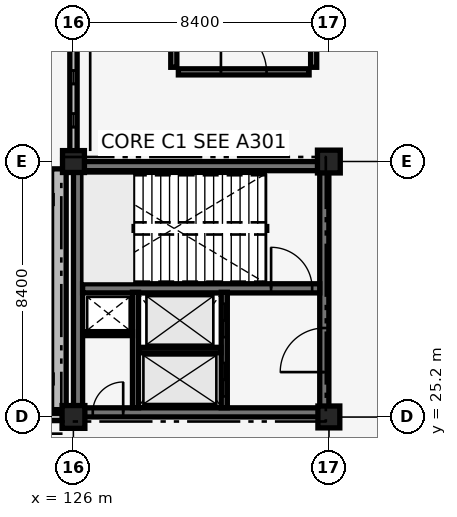
"""IFC4 building model, lengths in metres.
Left out: names, types, materials, properties, quantities, classifications, styles, units other than length and angle.
Written with IfcOpenShell. Run it as: python <this file> out.ifc"""

import sys

from ifc_helpers import new_model, si_unit, direction, frame, frame_2d, origin, origin_2d, place, context, subcontext, project, spatial, rectangle, extrude, element, fill, save


model = new_model("IFC4")
c1 = context("Model", 3, precision=1e-05, world=origin(), true_north=direction((0.0, 1.0)))
c2 = subcontext(c1, "Body", "Model", "MODEL_VIEW")
j1 = project(units=[si_unit("LENGTHUNIT", "METRE"), si_unit("PLANEANGLEUNIT", "RADIAN")], contexts=[c1])
p1 = place(None, origin())
s1 = spatial("IfcSite", under=j1, at=p1, CompositionType="ELEMENT")
p2 = place(p1, origin())
s2 = spatial("IfcBuilding", under=s1, at=p2, CompositionType="ELEMENT")
p3 = place(p2, origin())
s3 = spatial("IfcBuildingStorey", under=s2, at=p3, CompositionType="ELEMENT", Elevation=0.0)
p4 = place(p3, frame((126.15, 25.35, 0.0), z_axis=(0.0, 0.0, 1.0), x_axis=(1.0, 0.0, 0.0)))
e1 = element("IfcWall", 1, at=p4, inside=s3, PredefinedType="SHEAR", context=c2, shape_type="SweptSolid", body=[
    extrude(rectangle(XDim=8.1, YDim=0.3, at=frame_2d((4.05, 0.0))), origin(), (0.0, 0.0, 1.0), 5.14),
])
p5 = place(p4, frame((0.485, 0.0, 0.0)))
e2 = element("IfcOpeningElement", 2, at=p5, cuts=e1, PredefinedType="OPENING", context=c2, shape_type="SweptSolid", body=[
    extrude(rectangle(XDim=1.0, YDim=2.15, at=frame_2d((0.5, 1.075))), frame((0.0, 0.16, 0.0), z_axis=(0.0, -1.0, 0.0), x_axis=(1.0, 0.0, 0.0)), (0.0, 0.0, 1.0), 0.32),
])
p6 = place(p3, frame((126.15, 33.45, 0.0), z_axis=(0.0, 0.0, 1.0), x_axis=(1.0, 0.0, 0.0)))
e3 = element("IfcWall", 3, at=p6, inside=s3, PredefinedType="SHEAR", context=c2, shape_type="SweptSolid", body=[
    extrude(rectangle(XDim=8.1, YDim=0.3, at=frame_2d((4.05, 0.0))), origin(), (0.0, 0.0, 1.0), 5.14),
])
p7 = place(p3, frame((126.15, 25.35, 0.0), z_axis=(0.0, 0.0, 1.0), x_axis=(0.0, 1.0, 0.0)))
e4 = element("IfcWall", 4, at=p7, inside=s3, PredefinedType="SHEAR", context=c2, shape_type="SweptSolid", body=[
    extrude(rectangle(XDim=8.1, YDim=0.3, at=frame_2d((4.05, 0.0))), origin(), (0.0, 0.0, 1.0), 5.14),
])
p8 = place(p3, frame((134.25, 25.35, 0.0), z_axis=(0.0, 0.0, 1.0), x_axis=(0.0, 1.0, 0.0)))
e5 = element("IfcWall", 5, at=p8, inside=s3, PredefinedType="SHEAR", context=c2, shape_type="SweptSolid", body=[
    extrude(rectangle(XDim=8.1, YDim=0.3, at=frame_2d((4.05, 0.0))), origin(), (0.0, 0.0, 1.0), 5.14),
])
p9 = place(p8, frame((1.325, 0.0, 0.0)))
e6 = element("IfcOpeningElement", 6, at=p9, cuts=e5, PredefinedType="OPENING", context=c2, shape_type="SweptSolid", body=[
    extrude(rectangle(XDim=1.45, YDim=2.15, at=frame_2d((0.725, 1.075))), frame((0.0, 0.16, 0.0), z_axis=(0.0, -1.0, 0.0), x_axis=(1.0, 0.0, 0.0)), (0.0, 0.0, 1.0), 0.32),
])
p10 = place(p3, frame((126.3, 29.43, 0.0), z_axis=(0.0, 0.0, 1.0), x_axis=(1.0, 0.0, 0.0)))
e7 = element("IfcWall", 7, at=p10, inside=s3, PredefinedType="SHEAR", context=c2, shape_type="SweptSolid", body=[
    extrude(rectangle(XDim=7.8, YDim=0.3, at=frame_2d((3.9, 0.0))), origin(), (0.0, 0.0, 1.0), 5.14),
])
p11 = place(p10, frame((6.2, 0.0, 0.0)))
e8 = element("IfcOpeningElement", 8, at=p11, cuts=e7, PredefinedType="OPENING", context=c2, shape_type="SweptSolid", body=[
    extrude(rectangle(XDim=1.35, YDim=2.15, at=frame_2d((0.675, 1.075))), frame((0.0, 0.16, 0.0), z_axis=(0.0, -1.0, 0.0), x_axis=(1.0, 0.0, 0.0)), (0.0, 0.0, 1.0), 0.32),
])
p12 = place(p3, frame((126.0, 25.2, 0.0), z_axis=(0.0, 0.0, 1.0), x_axis=(1.0, 0.0, 0.0)))
e9 = element("IfcColumn", 9, at=p12, inside=s3, PredefinedType="COLUMN", context=c2, shape_type="SweptSolid", body=[
    extrude(rectangle(XDim=0.75, YDim=0.75, at=origin_2d()), origin(), (0.0, 0.0, 1.0), 5.14),
])
for number, where, z_axis, x_axis in (
    (10, (126.0, 33.6, 0.0), (0.0, 0.0, 1.0), (1.0, 0.0, 0.0)),
    (11, (134.4, 25.2, 0.0), (0.0, 0.0, 1.0), (1.0, 0.0, 0.0)),
):
    element("IfcColumn", number, at=place(p3, frame(where, z_axis=z_axis, x_axis=x_axis)), inside=s3, PredefinedType="COLUMN", context=c2, shape_type="SweptSolid", body=[
        extrude(rectangle(XDim=0.72, YDim=0.72, at=origin_2d()), origin(), (0.0, 0.0, 1.0), 5.14),
    ])
p13 = place(p3, frame((134.4, 33.6, 0.0), z_axis=(0.0, 0.0, 1.0), x_axis=(1.0, 0.0, 0.0)))
e12 = element("IfcColumn", 12, at=p13, inside=s3, PredefinedType="COLUMN", context=c2, shape_type="SweptSolid", body=[
    extrude(rectangle(XDim=0.75, YDim=0.75, at=origin_2d()), origin(), (0.0, 0.0, 1.0), 5.14),
])
p14 = place(p3, frame((117.875, 25.2, 0.0), z_axis=(0.0, 0.0, 1.0), x_axis=(1.0, 0.0, 0.0)))
e13 = element("IfcWall", 13, at=p14, inside=s3, PredefinedType="SOLIDWALL", context=c2, shape_type="SweptSolid", body=[
    extrude(rectangle(XDim=7.765, YDim=0.24, at=frame_2d((3.882, 0.0))), origin(), (0.0, 0.0, 1.0), 4.39),
])
p15 = place(p14, frame((0.796, 0.0, 0.35)))
e14 = element("IfcOpeningElement", 14, at=p15, cuts=e13, PredefinedType="OPENING", context=c2, shape_type="SweptSolid", body=[
    extrude(rectangle(XDim=0.44, YDim=1.25, at=frame_2d((0.22, 0.625))), frame((0.0, 0.13, 0.0), z_axis=(0.0, -1.0, 0.0), x_axis=(1.0, 0.0, 0.0)), (0.0, 0.0, 1.0), 0.26),
])
p16 = place(p14, frame((2.229, 0.0, 0.35)))
e15 = element("IfcOpeningElement", 15, at=p16, cuts=e13, PredefinedType="OPENING", context=c2, shape_type="SweptSolid", body=[
    extrude(rectangle(XDim=0.44, YDim=1.25, at=frame_2d((0.22, 0.625))), frame((0.0, 0.13, 0.0), z_axis=(0.0, -1.0, 0.0), x_axis=(1.0, 0.0, 0.0)), (0.0, 0.0, 1.0), 0.26),
])
p17 = place(p14, frame((3.663, 0.0, 0.35)))
e16 = element("IfcOpeningElement", 16, at=p17, cuts=e13, PredefinedType="OPENING", context=c2, shape_type="SweptSolid", body=[
    extrude(rectangle(XDim=0.44, YDim=1.25, at=frame_2d((0.22, 0.625))), frame((0.0, 0.13, 0.0), z_axis=(0.0, -1.0, 0.0), x_axis=(1.0, 0.0, 0.0)), (0.0, 0.0, 1.0), 0.26),
])
p18 = place(p14, frame((5.095, 0.0, 0.35)))
e17 = element("IfcOpeningElement", 17, at=p18, cuts=e13, PredefinedType="OPENING", context=c2, shape_type="SweptSolid", body=[
    extrude(rectangle(XDim=0.44, YDim=1.25, at=frame_2d((0.22, 0.625))), frame((0.0, 0.13, 0.0), z_axis=(0.0, -1.0, 0.0), x_axis=(1.0, 0.0, 0.0)), (0.0, 0.0, 1.0), 0.26),
])
p19 = place(p14, frame((6.529, 0.0, 0.35)))
e18 = element("IfcOpeningElement", 18, at=p19, cuts=e13, PredefinedType="OPENING", context=c2, shape_type="SweptSolid", body=[
    extrude(rectangle(XDim=0.44, YDim=1.25, at=frame_2d((0.22, 0.625))), frame((0.0, 0.13, 0.0), z_axis=(0.0, -1.0, 0.0), x_axis=(1.0, 0.0, 0.0)), (0.0, 0.0, 1.0), 0.26),
])
p20 = place(p14, frame((0.796, 0.0, 1.8)))
e19 = element("IfcOpeningElement", 19, at=p20, cuts=e13, PredefinedType="OPENING", context=c2, shape_type="SweptSolid", body=[
    extrude(rectangle(XDim=0.44, YDim=1.25, at=frame_2d((0.22, 0.625))), frame((0.0, 0.13, 0.0), z_axis=(0.0, -1.0, 0.0), x_axis=(1.0, 0.0, 0.0)), (0.0, 0.0, 1.0), 0.26),
])
p21 = place(p14, frame((2.229, 0.0, 1.8)))
e20 = element("IfcOpeningElement", 20, at=p21, cuts=e13, PredefinedType="OPENING", context=c2, shape_type="SweptSolid", body=[
    extrude(rectangle(XDim=0.44, YDim=1.25, at=frame_2d((0.22, 0.625))), frame((0.0, 0.13, 0.0), z_axis=(0.0, -1.0, 0.0), x_axis=(1.0, 0.0, 0.0)), (0.0, 0.0, 1.0), 0.26),
])
p22 = place(p14, frame((3.663, 0.0, 1.8)))
e21 = element("IfcOpeningElement", 21, at=p22, cuts=e13, PredefinedType="OPENING", context=c2, shape_type="SweptSolid", body=[
    extrude(rectangle(XDim=0.44, YDim=1.25, at=frame_2d((0.22, 0.625))), frame((0.0, 0.13, 0.0), z_axis=(0.0, -1.0, 0.0), x_axis=(1.0, 0.0, 0.0)), (0.0, 0.0, 1.0), 0.26),
])
p23 = place(p14, frame((5.095, 0.0, 1.8)))
e22 = element("IfcOpeningElement", 22, at=p23, cuts=e13, PredefinedType="OPENING", context=c2, shape_type="SweptSolid", body=[
    extrude(rectangle(XDim=0.44, YDim=1.25, at=frame_2d((0.22, 0.625))), frame((0.0, 0.13, 0.0), z_axis=(0.0, -1.0, 0.0), x_axis=(1.0, 0.0, 0.0)), (0.0, 0.0, 1.0), 0.26),
])
p24 = place(p14, frame((6.529, 0.0, 1.8)))
e23 = element("IfcOpeningElement", 23, at=p24, cuts=e13, PredefinedType="OPENING", context=c2, shape_type="SweptSolid", body=[
    extrude(rectangle(XDim=0.44, YDim=1.25, at=frame_2d((0.22, 0.625))), frame((0.0, 0.13, 0.0), z_axis=(0.0, -1.0, 0.0), x_axis=(1.0, 0.0, 0.0)), (0.0, 0.0, 1.0), 0.26),
])
p25 = place(p3, frame((125.52, 25.44, -0.25), z_axis=(0.0, 0.0, 1.0), x_axis=(0.0, 1.0, 0.0)))
e24 = element("IfcWall", 24, at=p25, inside=s3, PredefinedType="SOLIDWALL", context=c2, shape_type="SweptSolid", body=[
    extrude(rectangle(XDim=7.92, YDim=0.48, at=frame_2d((3.96, 0.0))), origin(), (0.0, 0.0, 1.0), 5.69),
])
p26 = place(p3, frame((126.0, 33.945, 0.0), z_axis=(0.0, 0.0, 1.0), x_axis=(0.0, 1.0, 0.0)))
e25 = element("IfcWall", 25, at=p26, inside=s3, PredefinedType="SOLIDWALL", context=c2, shape_type="SweptSolid", body=[
    extrude(rectangle(XDim=7.695, YDim=0.24, at=frame_2d((3.847, 0.0))), origin(), (0.0, 0.0, 1.0), 4.39),
])
p27 = place(p26, frame((0.79, 0.0, 0.35)))
e26 = element("IfcOpeningElement", 26, at=p27, cuts=e25, PredefinedType="OPENING", context=c2, shape_type="SweptSolid", body=[
    extrude(rectangle(XDim=0.44, YDim=1.25, at=frame_2d((0.22, 0.625))), frame((0.0, 0.13, 0.0), z_axis=(0.0, -1.0, 0.0), x_axis=(1.0, 0.0, 0.0)), (0.0, 0.0, 1.0), 0.26),
])
p28 = place(p26, frame((2.208, 0.0, 0.35)))
e27 = element("IfcOpeningElement", 27, at=p28, cuts=e25, PredefinedType="OPENING", context=c2, shape_type="SweptSolid", body=[
    extrude(rectangle(XDim=0.44, YDim=1.25, at=frame_2d((0.22, 0.625))), frame((0.0, 0.13, 0.0), z_axis=(0.0, -1.0, 0.0), x_axis=(1.0, 0.0, 0.0)), (0.0, 0.0, 1.0), 0.26),
])
p29 = place(p26, frame((3.627, 0.0, 0.35)))
e28 = element("IfcOpeningElement", 28, at=p29, cuts=e25, PredefinedType="OPENING", context=c2, shape_type="SweptSolid", body=[
    extrude(rectangle(XDim=0.44, YDim=1.25, at=frame_2d((0.22, 0.625))), frame((0.0, 0.13, 0.0), z_axis=(0.0, -1.0, 0.0), x_axis=(1.0, 0.0, 0.0)), (0.0, 0.0, 1.0), 0.26),
])
p30 = place(p26, frame((5.046, 0.0, 0.35)))
e29 = element("IfcOpeningElement", 29, at=p30, cuts=e25, PredefinedType="OPENING", context=c2, shape_type="SweptSolid", body=[
    extrude(rectangle(XDim=0.44, YDim=1.25, at=frame_2d((0.22, 0.625))), frame((0.0, 0.13, 0.0), z_axis=(0.0, -1.0, 0.0), x_axis=(1.0, 0.0, 0.0)), (0.0, 0.0, 1.0), 0.26),
])
p31 = place(p26, frame((6.466, 0.0, 0.35)))
e30 = element("IfcOpeningElement", 30, at=p31, cuts=e25, PredefinedType="OPENING", context=c2, shape_type="SweptSolid", body=[
    extrude(rectangle(XDim=0.44, YDim=1.25, at=frame_2d((0.22, 0.625))), frame((0.0, 0.13, 0.0), z_axis=(0.0, -1.0, 0.0), x_axis=(1.0, 0.0, 0.0)), (0.0, 0.0, 1.0), 0.26),
])
p32 = place(p26, frame((0.79, 0.0, 1.8)))
e31 = element("IfcOpeningElement", 31, at=p32, cuts=e25, PredefinedType="OPENING", context=c2, shape_type="SweptSolid", body=[
    extrude(rectangle(XDim=0.44, YDim=1.25, at=frame_2d((0.22, 0.625))), frame((0.0, 0.13, 0.0), z_axis=(0.0, -1.0, 0.0), x_axis=(1.0, 0.0, 0.0)), (0.0, 0.0, 1.0), 0.26),
])
p33 = place(p26, frame((2.208, 0.0, 1.8)))
e32 = element("IfcOpeningElement", 32, at=p33, cuts=e25, PredefinedType="OPENING", context=c2, shape_type="SweptSolid", body=[
    extrude(rectangle(XDim=0.44, YDim=1.25, at=frame_2d((0.22, 0.625))), frame((0.0, 0.13, 0.0), z_axis=(0.0, -1.0, 0.0), x_axis=(1.0, 0.0, 0.0)), (0.0, 0.0, 1.0), 0.26),
])
p34 = place(p26, frame((3.627, 0.0, 1.8)))
e33 = element("IfcOpeningElement", 33, at=p34, cuts=e25, PredefinedType="OPENING", context=c2, shape_type="SweptSolid", body=[
    extrude(rectangle(XDim=0.44, YDim=1.25, at=frame_2d((0.22, 0.625))), frame((0.0, 0.13, 0.0), z_axis=(0.0, -1.0, 0.0), x_axis=(1.0, 0.0, 0.0)), (0.0, 0.0, 1.0), 0.26),
])
p35 = place(p26, frame((5.046, 0.0, 1.8)))
e34 = element("IfcOpeningElement", 34, at=p35, cuts=e25, PredefinedType="OPENING", context=c2, shape_type="SweptSolid", body=[
    extrude(rectangle(XDim=0.44, YDim=1.25, at=frame_2d((0.22, 0.625))), frame((0.0, 0.13, 0.0), z_axis=(0.0, -1.0, 0.0), x_axis=(1.0, 0.0, 0.0)), (0.0, 0.0, 1.0), 0.26),
])
p36 = place(p26, frame((6.466, 0.0, 1.8)))
e35 = element("IfcOpeningElement", 35, at=p36, cuts=e25, PredefinedType="OPENING", context=c2, shape_type="SweptSolid", body=[
    extrude(rectangle(XDim=0.44, YDim=1.25, at=frame_2d((0.22, 0.625))), frame((0.0, 0.13, 0.0), z_axis=(0.0, -1.0, 0.0), x_axis=(1.0, 0.0, 0.0)), (0.0, 0.0, 1.0), 0.26),
])
p37 = place(p3, frame((130.96, 25.5, 0.0), z_axis=(0.0, 0.0, 1.0), x_axis=(0.0, 1.0, 0.0)))
e36 = element("IfcWall", 36, at=p37, inside=s3, PredefinedType="SHEAR", context=c2, shape_type="SweptSolid", body=[
    extrude(rectangle(XDim=3.8, YDim=0.2, at=frame_2d((1.9, 0.0))), origin(), (0.0, 0.0, 1.0), 4.46),
])
p38 = place(p37, frame((0.375, 0.0, 0.0)))
e37 = element("IfcOpeningElement", 37, at=p38, cuts=e36, PredefinedType="OPENING", context=c2, shape_type="SweptSolid", body=[
    extrude(rectangle(XDim=1.1, YDim=2.15, at=frame_2d((0.55, 1.075))), frame((0.0, 0.11, 0.0), z_axis=(0.0, -1.0, 0.0), x_axis=(1.0, 0.0, 0.0)), (0.0, 0.0, 1.0), 0.22),
])
p39 = place(p37, frame((2.325, 0.0, 0.0)))
e38 = element("IfcOpeningElement", 38, at=p39, cuts=e36, PredefinedType="OPENING", context=c2, shape_type="SweptSolid", body=[
    extrude(rectangle(XDim=1.1, YDim=2.15, at=frame_2d((0.55, 1.075))), frame((0.0, 0.11, 0.0), z_axis=(0.0, -1.0, 0.0), x_axis=(1.0, 0.0, 0.0)), (0.0, 0.0, 1.0), 0.22),
])
p40 = place(p3, frame((128.04, 25.5, 0.0), z_axis=(0.0, 0.0, 1.0), x_axis=(0.0, 1.0, 0.0)))
e39 = element("IfcWall", 39, at=p40, inside=s3, PredefinedType="SHEAR", context=c2, shape_type="SweptSolid", body=[
    extrude(rectangle(XDim=3.8, YDim=0.2, at=frame_2d((1.9, 0.0))), origin(), (0.0, 0.0, 1.0), 4.46),
])
p41 = place(p3, frame((128.15, 27.4, 0.0), z_axis=(0.0, 0.0, 1.0), x_axis=(1.0, 0.0, 0.0)))
e40 = element("IfcWall", 40, at=p41, inside=s3, PredefinedType="SHEAR", context=c2, shape_type="SweptSolid", body=[
    extrude(rectangle(XDim=2.7, YDim=0.18, at=frame_2d((1.35, 0.0))), origin(), (0.0, 0.0, 1.0), 5.14),
])
p42 = place(p3, frame((126.32, 27.94, 0.0), z_axis=(0.0, 0.0, 1.0), x_axis=(1.0, 0.0, 0.0)))
e41 = element("IfcWall", 41, at=p42, inside=s3, PredefinedType="PARTITIONING", context=c2, shape_type="SweptSolid", body=[
    extrude(rectangle(XDim=1.62, YDim=0.13, at=frame_2d((0.81, 0.0))), origin(), (0.0, 0.0, 1.0), 4.39),
])
p43 = place(p3, frame((129.45, 36.55, 0.0), z_axis=(0.0, 0.0, 1.0), x_axis=(1.0, 0.0, 0.0)))
e42 = element("IfcWall", 42, at=p43, inside=s3, PredefinedType="PARTITIONING", context=c2, shape_type="SweptSolid", body=[
    extrude(rectangle(XDim=4.3, YDim=0.2, at=frame_2d((2.15, 0.0))), origin(), (0.0, 0.0, 1.0), 5.14),
])
p44 = place(p43, frame((1.4, 0.0, 0.0)))
e43 = element("IfcOpeningElement", 43, at=p44, cuts=e42, PredefinedType="OPENING", context=c2, shape_type="SweptSolid", body=[
    extrude(rectangle(XDim=1.5, YDim=2.2, at=frame_2d((0.75, 1.1))), frame((0.0, 0.11, 0.0), z_axis=(0.0, -1.0, 0.0), x_axis=(1.0, 0.0, 0.0)), (0.0, 0.0, 1.0), 0.22),
])
p45 = place(p3, frame((129.3, 36.7, 0.0), z_axis=(0.0, 0.0, 1.0), x_axis=(0.0, 1.0, 0.0)))
e44 = element("IfcWall", 44, at=p45, inside=s3, PredefinedType="PARTITIONING", context=c2, shape_type="SweptSolid", body=[
    extrude(rectangle(XDim=47.27, YDim=0.2, at=frame_2d((23.635, 0.0))), origin(), (0.0, 0.0, 1.0), 4.36),
])
p46 = place(p3, frame((133.9, 36.7, 0.0), z_axis=(0.0, 0.0, 1.0), x_axis=(0.0, 1.0, 0.0)))
e45 = element("IfcWall", 45, at=p46, inside=s3, PredefinedType="PARTITIONING", context=c2, shape_type="SweptSolid", body=[
    extrude(rectangle(XDim=4.88, YDim=0.2, at=frame_2d((2.44, 0.0))), origin(), (0.0, 0.0, 1.0), 4.58),
])
p47 = place(p27, origin())
e46 = element("IfcWindow", 46, at=p47, inside=s3, PartitioningType="SINGLE_PANEL", PredefinedType="WINDOW", context=c2, shape_type="SweptSolid", body=[
    extrude(rectangle(XDim=0.44, YDim=1.25, at=frame_2d((0.22, 0.625))), frame((0.0, 0.03, 0.0), z_axis=(0.0, -1.0, 0.0), x_axis=(1.0, 0.0, 0.0)), (0.0, 0.0, 1.0), 0.06),
])
fill(e26, e46)
p48 = place(p28, origin())
e47 = element("IfcWindow", 47, at=p48, inside=s3, PartitioningType="SINGLE_PANEL", PredefinedType="WINDOW", context=c2, shape_type="SweptSolid", body=[
    extrude(rectangle(XDim=0.44, YDim=1.25, at=frame_2d((0.22, 0.625))), frame((0.0, 0.03, 0.0), z_axis=(0.0, -1.0, 0.0), x_axis=(1.0, 0.0, 0.0)), (0.0, 0.0, 1.0), 0.06),
])
fill(e27, e47)
p49 = place(p32, origin())
e48 = element("IfcWindow", 48, at=p49, inside=s3, PartitioningType="SINGLE_PANEL", PredefinedType="WINDOW", context=c2, shape_type="SweptSolid", body=[
    extrude(rectangle(XDim=0.44, YDim=1.25, at=frame_2d((0.22, 0.625))), frame((0.0, 0.03, 0.0), z_axis=(0.0, -1.0, 0.0), x_axis=(1.0, 0.0, 0.0)), (0.0, 0.0, 1.0), 0.06),
])
fill(e31, e48)
p50 = place(p33, origin())
e49 = element("IfcWindow", 49, at=p50, inside=s3, PartitioningType="SINGLE_PANEL", PredefinedType="WINDOW", context=c2, shape_type="SweptSolid", body=[
    extrude(rectangle(XDim=0.44, YDim=1.25, at=frame_2d((0.22, 0.625))), frame((0.0, 0.03, 0.0), z_axis=(0.0, -1.0, 0.0), x_axis=(1.0, 0.0, 0.0)), (0.0, 0.0, 1.0), 0.06),
])
fill(e32, e49)
p51 = place(p11, origin())
e50 = element("IfcDoor", 50, at=p51, inside=s3, OperationType="SINGLE_SWING_LEFT", PredefinedType="DOOR", context=c2, shape_type="SweptSolid", body=[
    extrude(rectangle(XDim=1.35, YDim=2.15, at=frame_2d((0.675, 1.075))), frame((0.0, 0.025, 0.0), z_axis=(0.0, -1.0, 0.0), x_axis=(1.0, 0.0, 0.0)), (0.0, 0.0, 1.0), 0.05),
])
fill(e8, e50)
p52 = place(p38, origin())
e51 = element("IfcDoor", 51, at=p52, inside=s3, OperationType="SLIDING_TO_LEFT", PredefinedType="DOOR", context=c2, shape_type="SweptSolid", body=[
    extrude(rectangle(XDim=1.1, YDim=2.15, at=frame_2d((0.55, 1.075))), frame((0.0, 0.025, 0.0), z_axis=(0.0, -1.0, 0.0), x_axis=(1.0, 0.0, 0.0)), (0.0, 0.0, 1.0), 0.05),
])
fill(e37, e51)
p53 = place(p39, origin())
e52 = element("IfcDoor", 52, at=p53, inside=s3, OperationType="SLIDING_TO_LEFT", PredefinedType="DOOR", context=c2, shape_type="SweptSolid", body=[
    extrude(rectangle(XDim=1.1, YDim=2.15, at=frame_2d((0.55, 1.075))), frame((0.0, 0.025, 0.0), z_axis=(0.0, -1.0, 0.0), x_axis=(1.0, 0.0, 0.0)), (0.0, 0.0, 1.0), 0.05),
])
fill(e38, e52)
p54 = place(p9, origin())
e53 = element("IfcDoor", 53, at=p54, inside=s3, OperationType="DOUBLE_DOOR_SINGLE_SWING", PredefinedType="DOOR", context=c2, shape_type="SweptSolid", body=[
    extrude(rectangle(XDim=1.45, YDim=2.15, at=frame_2d((0.725, 1.075))), frame((0.0, 0.025, 0.0), z_axis=(0.0, -1.0, 0.0), x_axis=(1.0, 0.0, 0.0)), (0.0, 0.0, 1.0), 0.05),
])
fill(e6, e53)
p55 = place(p5, origin())
e54 = element("IfcDoor", 54, at=p55, inside=s3, OperationType="SINGLE_SWING_RIGHT", PredefinedType="DOOR", context=c2, shape_type="SweptSolid", body=[
    extrude(rectangle(XDim=1.0, YDim=2.15, at=frame_2d((0.5, 1.075))), frame((0.0, 0.025, 0.0), z_axis=(0.0, -1.0, 0.0), x_axis=(1.0, 0.0, 0.0)), (0.0, 0.0, 1.0), 0.05),
])
fill(e2, e54)
p56 = place(p44, origin())
e55 = element("IfcDoor", 55, at=p56, inside=s3, OperationType="DOUBLE_DOOR_SINGLE_SWING", PredefinedType="DOOR", context=c2, shape_type="SweptSolid", body=[
    extrude(rectangle(XDim=1.5, YDim=2.2, at=frame_2d((0.75, 1.1))), frame((0.0, 0.025, 0.0), z_axis=(0.0, -1.0, 0.0), x_axis=(1.0, 0.0, 0.0)), (0.0, 0.0, 1.0), 0.05),
])
fill(e43, e55)
save(model, sys.argv[1])
